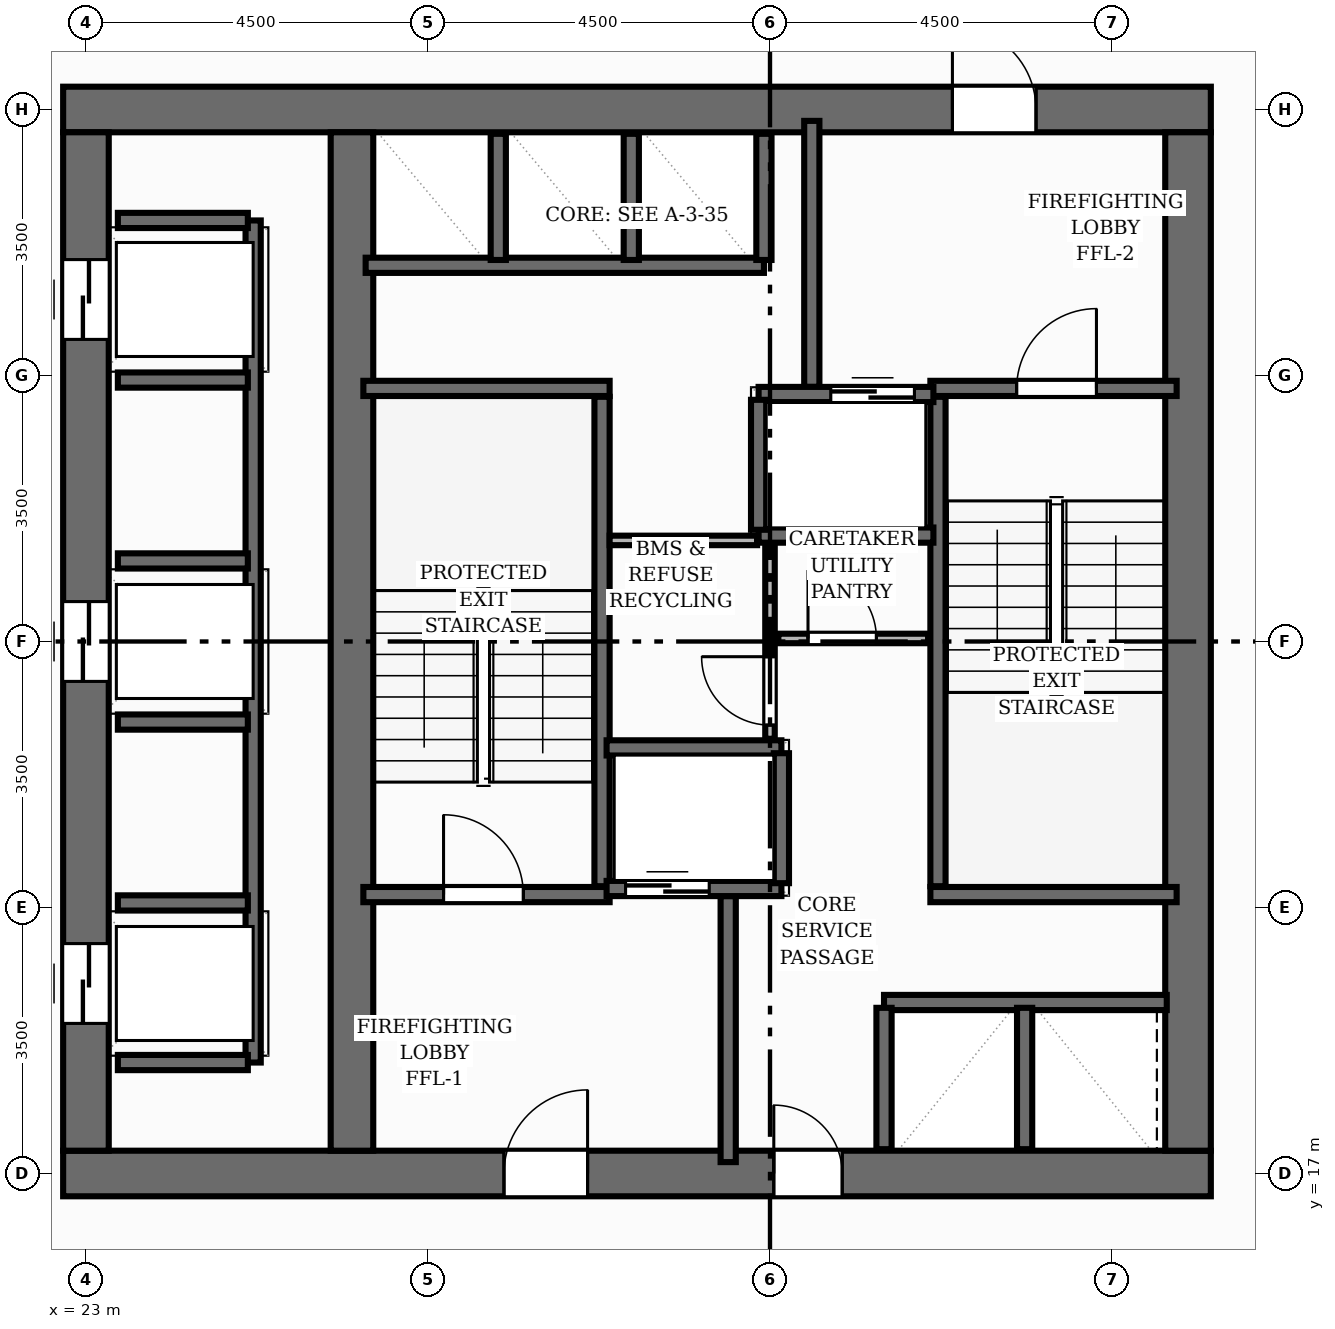
"""IFC4 building model, lengths in metres.
Left out: names, types, materials, properties, quantities, classifications, styles, units other than length and angle.
Written with IfcOpenShell. Run it as: python <this file> out.ifc"""

import sys

from ifc_helpers import new_model, si_unit, direction, frame, frame_2d, origin, place, context, subcontext, project, spatial, rectangle, extrude, element, fill, save


model = new_model("IFC4")
c1 = context("Model", 3, precision=1e-05, world=origin(), true_north=direction((0.0, 1.0)))
c2 = subcontext(c1, "Body", "Model", "MODEL_VIEW")
j1 = project(units=[si_unit("LENGTHUNIT", "METRE"), si_unit("PLANEANGLEUNIT", "RADIAN")], contexts=[c1])
p1 = place(None, origin())
s1 = spatial("IfcSite", under=j1, at=p1, CompositionType="ELEMENT")
p2 = place(p1, origin())
s2 = spatial("IfcBuilding", under=s1, at=p2, CompositionType="ELEMENT")
p3 = place(p2, frame((0.0, 0.0, 145.76)))
s3 = spatial("IfcBuildingStorey", under=s2, at=p3, CompositionType="ELEMENT", Elevation=145.76)
p4 = place(p3, frame((22.7, 17.0, 0.0), z_axis=(0.0, 0.0, 1.0), x_axis=(1.0, 0.0, 0.0)))
e1 = element("IfcWall", 1, at=p4, inside=s3, PredefinedType="SHEAR", context=c2, shape_type="SweptSolid", body=[
    extrude(rectangle(XDim=15.1, YDim=0.6, at=frame_2d((7.55, 0.0))), origin(), (0.0, 0.0, 1.0), 3.2),
])
p5 = place(p4, frame((5.8, 0.0, 0.0)))
e2 = element("IfcOpeningElement", 2, at=p5, cuts=e1, PredefinedType="OPENING", context=c2, shape_type="SweptSolid", body=[
    extrude(rectangle(XDim=1.1, YDim=2.15, at=frame_2d((0.55, 1.075))), frame((0.0, 0.31, 0.0), z_axis=(0.0, -1.0, 0.0), x_axis=(1.0, 0.0, 0.0)), (0.0, 0.0, 1.0), 0.62),
])
p6 = place(p4, frame((9.35, 0.0, 0.0)))
e3 = element("IfcOpeningElement", 3, at=p6, cuts=e1, PredefinedType="OPENING", context=c2, shape_type="SweptSolid", body=[
    extrude(rectangle(XDim=0.9, YDim=2.1, at=frame_2d((0.45, 1.05))), frame((0.0, 0.31, 0.0), z_axis=(0.0, -1.0, 0.0), x_axis=(1.0, 0.0, 0.0)), (0.0, 0.0, 1.0), 0.62),
])
p7 = place(p3, frame((22.7, 31.0, 0.0), z_axis=(0.0, 0.0, 1.0), x_axis=(1.0, 0.0, 0.0)))
e4 = element("IfcWall", 4, at=p7, inside=s3, PredefinedType="SHEAR", context=c2, shape_type="SweptSolid", body=[
    extrude(rectangle(XDim=15.1, YDim=0.6, at=frame_2d((7.55, 0.0))), origin(), (0.0, 0.0, 1.0), 3.2),
])
p8 = place(p7, frame((11.7, 0.0, 0.0)))
e5 = element("IfcOpeningElement", 5, at=p8, cuts=e4, PredefinedType="OPENING", context=c2, shape_type="SweptSolid", body=[
    extrude(rectangle(XDim=1.1, YDim=2.15, at=frame_2d((0.55, 1.075))), frame((0.0, 0.31, 0.0), z_axis=(0.0, -1.0, 0.0), x_axis=(1.0, 0.0, 0.0)), (0.0, 0.0, 1.0), 0.62),
])
p9 = place(p3, frame((23.0, 17.3, 0.0), z_axis=(0.0, 0.0, 1.0), x_axis=(0.0, 1.0, 0.0)))
e6 = element("IfcWall", 6, at=p9, inside=s3, PredefinedType="SHEAR", context=c2, shape_type="SweptSolid", body=[
    extrude(rectangle(XDim=13.4, YDim=0.6, at=frame_2d((6.7, 0.0))), origin(), (0.0, 0.0, 1.0), 3.2),
])
p10 = place(p9, frame((1.675, 0.0, 0.0)))
e7 = element("IfcOpeningElement", 7, at=p10, cuts=e6, PredefinedType="OPENING", context=c2, shape_type="SweptSolid", body=[
    extrude(rectangle(XDim=1.05, YDim=2.15, at=frame_2d((0.525, 1.075))), frame((0.0, 0.31, 0.0), z_axis=(0.0, -1.0, 0.0), x_axis=(1.0, 0.0, 0.0)), (0.0, 0.0, 1.0), 0.62),
])
p11 = place(p9, frame((6.175, 0.0, 0.0)))
e8 = element("IfcOpeningElement", 8, at=p11, cuts=e6, PredefinedType="OPENING", context=c2, shape_type="SweptSolid", body=[
    extrude(rectangle(XDim=1.05, YDim=2.15, at=frame_2d((0.525, 1.075))), frame((0.0, 0.31, 0.0), z_axis=(0.0, -1.0, 0.0), x_axis=(1.0, 0.0, 0.0)), (0.0, 0.0, 1.0), 0.62),
])
p12 = place(p9, frame((10.675, 0.0, 0.0)))
e9 = element("IfcOpeningElement", 9, at=p12, cuts=e6, PredefinedType="OPENING", context=c2, shape_type="SweptSolid", body=[
    extrude(rectangle(XDim=1.05, YDim=2.15, at=frame_2d((0.525, 1.075))), frame((0.0, 0.31, 0.0), z_axis=(0.0, -1.0, 0.0), x_axis=(1.0, 0.0, 0.0)), (0.0, 0.0, 1.0), 0.62),
])
p13 = place(p3, frame((37.5, 17.3, 0.0), z_axis=(0.0, 0.0, 1.0), x_axis=(0.0, 1.0, 0.0)))
e10 = element("IfcWall", 10, at=p13, inside=s3, PredefinedType="SHEAR", context=c2, shape_type="SweptSolid", body=[
    extrude(rectangle(XDim=13.4, YDim=0.6, at=frame_2d((6.7, 0.0))), origin(), (0.0, 0.0, 1.0), 3.2),
])
p14 = place(p3, frame((26.5, 17.3, 0.0), z_axis=(0.0, 0.0, 1.0), x_axis=(0.0, 1.0, 0.0)))
e11 = element("IfcWall", 11, at=p14, inside=s3, PredefinedType="SHEAR", context=c2, shape_type="SweptSolid", body=[
    extrude(rectangle(XDim=13.4, YDim=0.56, at=frame_2d((6.7, 0.0))), origin(), (0.0, 0.0, 1.0), 3.2),
])
p15 = place(p3, frame((29.79, 20.78, 0.0), z_axis=(0.0, 0.0, 1.0), x_axis=(0.0, 1.0, 0.0)))
e12 = element("IfcWall", 12, at=p15, inside=s3, PredefinedType="SHEAR", context=c2, shape_type="SweptSolid", body=[
    extrude(rectangle(XDim=6.44, YDim=0.2, at=frame_2d((3.22, 0.0))), origin(), (0.0, 0.0, 1.0), 3.2),
])
p16 = place(p3, frame((26.65, 27.33, 0.0), z_axis=(0.0, 0.0, 1.0), x_axis=(1.0, 0.0, 0.0)))
e13 = element("IfcWall", 13, at=p16, inside=s3, PredefinedType="SHEAR", context=c2, shape_type="SweptSolid", body=[
    extrude(rectangle(XDim=3.24, YDim=0.2, at=frame_2d((1.62, 0.0))), origin(), (0.0, 0.0, 1.0), 3.2),
])
p17 = place(p3, frame((26.65, 20.67, 0.0), z_axis=(0.0, 0.0, 1.0), x_axis=(1.0, 0.0, 0.0)))
e14 = element("IfcWall", 14, at=p17, inside=s3, PredefinedType="SHEAR", context=c2, shape_type="SweptSolid", body=[
    extrude(rectangle(XDim=3.24, YDim=0.2, at=frame_2d((1.62, 0.0))), origin(), (0.0, 0.0, 1.0), 3.2),
])
p18 = place(p17, frame((1.055, 0.0, 0.0)))
e15 = element("IfcOpeningElement", 15, at=p18, cuts=e14, PredefinedType="OPENING", context=c2, shape_type="SweptSolid", body=[
    extrude(rectangle(XDim=1.05, YDim=2.15, at=frame_2d((0.525, 1.075))), frame((0.0, 0.11, 0.0), z_axis=(0.0, -1.0, 0.0), x_axis=(1.0, 0.0, 0.0)), (0.0, 0.0, 1.0), 0.22),
])
p19 = place(p3, frame((34.21, 20.78, 0.0), z_axis=(0.0, 0.0, 1.0), x_axis=(0.0, 1.0, 0.0)))
e16 = element("IfcWall", 16, at=p19, inside=s3, PredefinedType="SHEAR", context=c2, shape_type="SweptSolid", body=[
    extrude(rectangle(XDim=6.44, YDim=0.2, at=frame_2d((3.22, 0.0))), origin(), (0.0, 0.0, 1.0), 3.2),
])
p20 = place(p3, frame((34.11, 20.67, 0.0), z_axis=(0.0, 0.0, 1.0), x_axis=(1.0, 0.0, 0.0)))
e17 = element("IfcWall", 17, at=p20, inside=s3, PredefinedType="SHEAR", context=c2, shape_type="SweptSolid", body=[
    extrude(rectangle(XDim=3.24, YDim=0.2, at=frame_2d((1.62, 0.0))), origin(), (0.0, 0.0, 1.0), 3.2),
])
p21 = place(p3, frame((34.11, 27.33, 0.0), z_axis=(0.0, 0.0, 1.0), x_axis=(1.0, 0.0, 0.0)))
e18 = element("IfcWall", 18, at=p21, inside=s3, PredefinedType="SHEAR", context=c2, shape_type="SweptSolid", body=[
    extrude(rectangle(XDim=3.24, YDim=0.2, at=frame_2d((1.62, 0.0))), origin(), (0.0, 0.0, 1.0), 3.2),
])
p22 = place(p21, frame((1.135, 0.0, 0.0)))
e19 = element("IfcOpeningElement", 19, at=p22, cuts=e18, PredefinedType="OPENING", context=c2, shape_type="SweptSolid", body=[
    extrude(rectangle(XDim=1.05, YDim=2.15, at=frame_2d((0.525, 1.075))), frame((0.0, 0.11, 0.0), z_axis=(0.0, -1.0, 0.0), x_axis=(1.0, 0.0, 0.0)), (0.0, 0.0, 1.0), 0.22),
])
for number, where, z_axis, x_axis in (
    (20, (31.45, 17.15, 0.0), (0.0, 0.0, 1.0), (0.0, 1.0, 0.0)),
    (21, (32.55, 27.35, 0.0), (0.0, 0.0, 1.0), (0.0, 1.0, 0.0)),
):
    element("IfcWall", number, at=place(p3, frame(where, z_axis=z_axis, x_axis=x_axis)), inside=s3, PredefinedType="SHEAR", context=c2, shape_type="SweptSolid", body=[
        extrude(rectangle(XDim=3.5, YDim=0.2, at=frame_2d((1.75, 0.0))), origin(), (0.0, 0.0, 1.0), 3.2),
    ])
p23 = place(p3, frame((29.85, 20.75, 0.0), z_axis=(0.0, 0.0, 1.0), x_axis=(1.0, 0.0, 0.0)))
e22 = element("IfcWall", 22, at=p23, inside=s3, PredefinedType="SHEAR", context=c2, shape_type="SweptSolid", body=[
    extrude(rectangle(XDim=2.3, YDim=0.2, at=frame_2d((1.15, 0.0))), origin(), (0.0, 0.0, 1.0), 3.2),
])
p24 = place(p23, frame((0.25, 0.0, 0.0)))
e23 = element("IfcOpeningElement", 23, at=p24, cuts=e22, PredefinedType="OPENING", context=c2, shape_type="SweptSolid", body=[
    extrude(rectangle(XDim=1.1, YDim=2.15, at=frame_2d((0.55, 1.075))), frame((0.0, 0.11, 0.0), z_axis=(0.0, -1.0, 0.0), x_axis=(1.0, 0.0, 0.0)), (0.0, 0.0, 1.0), 0.22),
])
p25 = place(p3, frame((29.85, 22.6, 0.0), z_axis=(0.0, 0.0, 1.0), x_axis=(1.0, 0.0, 0.0)))
e24 = element("IfcWall", 24, at=p25, inside=s3, PredefinedType="SHEAR", context=c2, shape_type="SweptSolid", body=[
    extrude(rectangle(XDim=2.3, YDim=0.2, at=frame_2d((1.15, 0.0))), origin(), (0.0, 0.0, 1.0), 3.2),
])
p26 = place(p3, frame((32.15, 20.82, 0.0), z_axis=(0.0, 0.0, 1.0), x_axis=(0.0, 1.0, 0.0)))
e25 = element("IfcWall", 25, at=p26, inside=s3, PredefinedType="SHEAR", context=c2, shape_type="SweptSolid", body=[
    extrude(rectangle(XDim=1.71, YDim=0.2, at=frame_2d((0.855, 0.0))), origin(), (0.0, 0.0, 1.0), 3.2),
])
p27 = place(p3, frame((31.85, 27.25, 0.0), z_axis=(0.0, 0.0, 1.0), x_axis=(1.0, 0.0, 0.0)))
e26 = element("IfcWall", 26, at=p27, inside=s3, PredefinedType="SHEAR", context=c2, shape_type="SweptSolid", body=[
    extrude(rectangle(XDim=2.3, YDim=0.2, at=frame_2d((1.15, 0.0))), origin(), (0.0, 0.0, 1.0), 3.2),
])
p28 = place(p27, frame((0.95, 0.0, 0.0)))
e27 = element("IfcOpeningElement", 27, at=p28, cuts=e26, PredefinedType="OPENING", context=c2, shape_type="SweptSolid", body=[
    extrude(rectangle(XDim=1.1, YDim=2.15, at=frame_2d((0.55, 1.075))), frame((0.0, 0.11, 0.0), z_axis=(0.0, -1.0, 0.0), x_axis=(1.0, 0.0, 0.0)), (0.0, 0.0, 1.0), 0.22),
])
p29 = place(p3, frame((31.85, 25.4, 0.0), z_axis=(0.0, 0.0, 1.0), x_axis=(1.0, 0.0, 0.0)))
e28 = element("IfcWall", 28, at=p29, inside=s3, PredefinedType="SHEAR", context=c2, shape_type="SweptSolid", body=[
    extrude(rectangle(XDim=2.3, YDim=0.2, at=frame_2d((1.15, 0.0))), origin(), (0.0, 0.0, 1.0), 3.2),
])
p30 = place(p3, frame((31.85, 25.47, 0.0), z_axis=(0.0, 0.0, 1.0), x_axis=(0.0, 1.0, 0.0)))
e29 = element("IfcWall", 29, at=p30, inside=s3, PredefinedType="SHEAR", context=c2, shape_type="SweptSolid", body=[
    extrude(rectangle(XDim=1.71, YDim=0.2, at=frame_2d((0.855, 0.0))), origin(), (0.0, 0.0, 1.0), 3.2),
])
p31 = place(p3, frame((25.2, 18.46, 0.0), z_axis=(0.0, 0.0, 1.0), x_axis=(0.0, 1.0, 0.0)))
e30 = element("IfcWall", 30, at=p31, inside=s3, PredefinedType="SHEAR", context=c2, shape_type="SweptSolid", body=[
    extrude(rectangle(XDim=11.08, YDim=0.2, at=frame_2d((5.54, 0.0))), origin(), (0.0, 0.0, 1.0), 3.2),
])
for number, where, z_axis, x_axis in (
    (31, (23.42, 18.46, 0.0), (0.0, 0.0, 1.0), (1.0, 0.0, 0.0)),
    (32, (23.42, 29.54, 0.0), (0.0, 0.0, 1.0), (1.0, 0.0, 0.0)),
    (33, (23.42, 20.56, 0.0), (0.0, 0.0, 1.0), (1.0, 0.0, 0.0)),
    (34, (23.42, 22.94, 0.0), (0.0, 0.0, 1.0), (1.0, 0.0, 0.0)),
    (35, (23.42, 25.06, 0.0), (0.0, 0.0, 1.0), (1.0, 0.0, 0.0)),
    (36, (23.42, 27.44, 0.0), (0.0, 0.0, 1.0), (1.0, 0.0, 0.0)),
):
    element("IfcWall", number, at=place(p3, frame(where, z_axis=z_axis, x_axis=x_axis)), inside=s3, PredefinedType="SHEAR", context=c2, shape_type="SweptSolid", body=[
        extrude(rectangle(XDim=1.71, YDim=0.2, at=frame_2d((0.855, 0.0))), origin(), (0.0, 0.0, 1.0), 3.2),
    ])
p32 = place(p3, frame((26.68, 28.95, 0.0), z_axis=(0.0, 0.0, 1.0), x_axis=(1.0, 0.0, 0.0)))
e37 = element("IfcWall", 37, at=p32, inside=s3, PredefinedType="SHEAR", context=c2, shape_type="SweptSolid", body=[
    extrude(rectangle(XDim=5.24, YDim=0.2, at=frame_2d((2.62, 0.0))), origin(), (0.0, 0.0, 1.0), 3.2),
])
for number, where, z_axis, x_axis in (
    (38, (31.92, 29.02, 0.0), (0.0, 0.0, 1.0), (0.0, 1.0, 0.0)),
    (39, (28.425, 29.02, 0.0), (0.0, 0.0, 1.0), (0.0, 1.0, 0.0)),
    (40, (30.175, 29.02, 0.0), (0.0, 0.0, 1.0), (0.0, 1.0, 0.0)),
):
    element("IfcWall", number, at=place(p3, frame(where, z_axis=z_axis, x_axis=x_axis)), inside=s3, PredefinedType="SHEAR", context=c2, shape_type="SweptSolid", body=[
        extrude(rectangle(XDim=1.66, YDim=0.2, at=frame_2d((0.83, 0.0))), origin(), (0.0, 0.0, 1.0), 3.2),
    ])
p33 = place(p3, frame((33.5, 19.25, 0.0), z_axis=(0.0, 0.0, 1.0), x_axis=(1.0, 0.0, 0.0)))
e41 = element("IfcWall", 41, at=p33, inside=s3, PredefinedType="SHEAR", context=c2, shape_type="SweptSolid", body=[
    extrude(rectangle(XDim=3.72, YDim=0.2, at=frame_2d((1.86, 0.0))), origin(), (0.0, 0.0, 1.0), 3.2),
])
for number, where, z_axis, x_axis in (
    (42, (33.5, 17.32, 0.0), (0.0, 0.0, 1.0), (0.0, 1.0, 0.0)),
    (43, (35.35, 17.32, 0.0), (0.0, 0.0, 1.0), (0.0, 1.0, 0.0)),
):
    element("IfcWall", number, at=place(p3, frame(where, z_axis=z_axis, x_axis=x_axis)), inside=s3, PredefinedType="SHEAR", context=c2, shape_type="SweptSolid", body=[
        extrude(rectangle(XDim=1.86, YDim=0.2, at=frame_2d((0.93, 0.0))), origin(), (0.0, 0.0, 1.0), 3.2),
    ])
p34 = place(p3, frame((32.0, 22.72, 0.0), z_axis=(0.0, 0.0, 1.0), x_axis=(0.0, 1.0, 0.0)))
e44 = element("IfcWall", 44, at=p34, inside=s3, PredefinedType="PARTITIONING", context=c2, shape_type="SweptSolid", body=[
    extrude(rectangle(XDim=2.52, YDim=0.125, at=frame_2d((1.26, 0.0))), origin(), (0.0, 0.0, 1.0), 2.955),
])
p35 = place(p34, frame((0.18, 0.0, 0.0)))
e45 = element("IfcOpeningElement", 45, at=p35, cuts=e44, PredefinedType="OPENING", context=c2, shape_type="SweptSolid", body=[
    extrude(rectangle(XDim=0.9, YDim=2.1, at=frame_2d((0.45, 1.05))), frame((0.0, 0.073, 0.0), z_axis=(0.0, -1.0, 0.0), x_axis=(1.0, 0.0, 0.0)), (0.0, 0.0, 1.0), 0.145),
])
p36 = place(p3, frame((32.11, 24.04, 0.0), z_axis=(0.0, 0.0, 1.0), x_axis=(1.0, 0.0, 0.0)))
e46 = element("IfcWall", 46, at=p36, inside=s3, PredefinedType="PARTITIONING", context=c2, shape_type="SweptSolid", body=[
    extrude(rectangle(XDim=1.97, YDim=0.125, at=frame_2d((0.985, 0.0))), origin(), (0.0, 0.0, 1.0), 2.955),
])
p37 = place(p36, frame((0.39, 0.0, 0.0)))
e47 = element("IfcOpeningElement", 47, at=p37, cuts=e46, PredefinedType="OPENING", context=c2, shape_type="SweptSolid", body=[
    extrude(rectangle(XDim=0.9, YDim=2.1, at=frame_2d((0.45, 1.05))), frame((0.0, 0.073, 0.0), z_axis=(0.0, -1.0, 0.0), x_axis=(1.0, 0.0, 0.0)), (0.0, 0.0, 1.0), 0.145),
])
p38 = place(p3, frame((29.89, 25.33, 0.0), z_axis=(0.0, 0.0, 1.0), x_axis=(1.0, 0.0, 0.0)))
e48 = element("IfcWall", 48, at=p38, inside=s3, PredefinedType="PARTITIONING", context=c2, shape_type="SweptSolid", body=[
    extrude(rectangle(XDim=1.94, YDim=0.125, at=frame_2d((0.97, 0.0))), origin(), (0.0, 0.0, 1.0), 2.955),
])
p39 = place(p3, frame((43.184, 17.96, 0.0), z_axis=(0.0, 0.0, 1.0), x_axis=(-0.790862802872, -0.611993486104, 0.0)))
e49 = element("IfcWall", 49, at=p39, inside=s3, PredefinedType="PARTITIONING", context=c2, shape_type="SweptSolid", body=[
    extrude(rectangle(XDim=9.975, YDim=0.125, at=frame_2d((4.987, 0.0))), origin(), (0.0, 0.0, 1.0), 2.411),
])
p40 = place(p39, frame((3.417, 0.0, 0.0)))
e50 = element("IfcOpeningElement", 50, at=p40, cuts=e49, PredefinedType="OPENING", context=c2, shape_type="SweptSolid", body=[
    extrude(rectangle(XDim=0.9, YDim=2.1, at=frame_2d((0.45, 1.05))), frame((0.0, 0.073, 0.0), z_axis=(0.0, -1.0, 0.0), x_axis=(1.0, 0.0, 0.0)), (0.0, 0.0, 1.0), 0.145),
])
p41 = place(p18, origin())
e51 = element("IfcDoor", 51, at=p41, inside=s3, OperationType="SINGLE_SWING_LEFT", PredefinedType="DOOR", context=c2, shape_type="SweptSolid", body=[
    extrude(rectangle(XDim=1.05, YDim=2.15, at=frame_2d((0.525, 1.075))), frame((0.0, 0.025, 0.0), z_axis=(0.0, -1.0, 0.0), x_axis=(1.0, 0.0, 0.0)), (0.0, 0.0, 1.0), 0.05),
])
fill(e15, e51)
p42 = place(p22, origin())
e52 = element("IfcDoor", 52, at=p42, inside=s3, OperationType="SINGLE_SWING_RIGHT", PredefinedType="DOOR", context=c2, shape_type="SweptSolid", body=[
    extrude(rectangle(XDim=1.05, YDim=2.15, at=frame_2d((0.525, 1.075))), frame((0.0, 0.025, 0.0), z_axis=(0.0, -1.0, 0.0), x_axis=(1.0, 0.0, 0.0)), (0.0, 0.0, 1.0), 0.05),
])
fill(e19, e52)
p43 = place(p5, origin())
e53 = element("IfcDoor", 53, at=p43, inside=s3, OperationType="SINGLE_SWING_RIGHT", PredefinedType="DOOR", context=c2, shape_type="SweptSolid", body=[
    extrude(rectangle(XDim=1.1, YDim=2.15, at=frame_2d((0.55, 1.075))), frame((0.0, 0.025, 0.0), z_axis=(0.0, -1.0, 0.0), x_axis=(1.0, 0.0, 0.0)), (0.0, 0.0, 1.0), 0.05),
])
fill(e2, e53)
p44 = place(p8, origin())
e54 = element("IfcDoor", 54, at=p44, inside=s3, OperationType="SINGLE_SWING_LEFT", PredefinedType="DOOR", context=c2, shape_type="SweptSolid", body=[
    extrude(rectangle(XDim=1.1, YDim=2.15, at=frame_2d((0.55, 1.075))), frame((0.0, 0.025, 0.0), z_axis=(0.0, -1.0, 0.0), x_axis=(1.0, 0.0, 0.0)), (0.0, 0.0, 1.0), 0.05),
])
fill(e5, e54)
p45 = place(p24, origin())
e55 = element("IfcDoor", 55, at=p45, inside=s3, OperationType="DOUBLE_DOOR_SLIDING", PredefinedType="DOOR", context=c2, shape_type="SweptSolid", body=[
    extrude(rectangle(XDim=1.1, YDim=2.15, at=frame_2d((0.55, 1.075))), frame((0.0, 0.025, 0.0), z_axis=(0.0, -1.0, 0.0), x_axis=(1.0, 0.0, 0.0)), (0.0, 0.0, 1.0), 0.05),
])
fill(e23, e55)
p46 = place(p28, origin())
e56 = element("IfcDoor", 56, at=p46, inside=s3, OperationType="DOUBLE_DOOR_SLIDING", PredefinedType="DOOR", context=c2, shape_type="SweptSolid", body=[
    extrude(rectangle(XDim=1.1, YDim=2.15, at=frame_2d((0.55, 1.075))), frame((0.0, 0.025, 0.0), z_axis=(0.0, -1.0, 0.0), x_axis=(1.0, 0.0, 0.0)), (0.0, 0.0, 1.0), 0.05),
])
fill(e27, e56)
p47 = place(p10, origin())
e57 = element("IfcDoor", 57, at=p47, inside=s3, OperationType="DOUBLE_DOOR_SLIDING", PredefinedType="DOOR", context=c2, shape_type="SweptSolid", body=[
    extrude(rectangle(XDim=1.05, YDim=2.15, at=frame_2d((0.525, 1.075))), frame((0.0, 0.025, 0.0), z_axis=(0.0, -1.0, 0.0), x_axis=(1.0, 0.0, 0.0)), (0.0, 0.0, 1.0), 0.05),
])
fill(e7, e57)
p48 = place(p11, origin())
e58 = element("IfcDoor", 58, at=p48, inside=s3, OperationType="DOUBLE_DOOR_SLIDING", PredefinedType="DOOR", context=c2, shape_type="SweptSolid", body=[
    extrude(rectangle(XDim=1.05, YDim=2.15, at=frame_2d((0.525, 1.075))), frame((0.0, 0.025, 0.0), z_axis=(0.0, -1.0, 0.0), x_axis=(1.0, 0.0, 0.0)), (0.0, 0.0, 1.0), 0.05),
])
fill(e8, e58)
p49 = place(p12, origin())
e59 = element("IfcDoor", 59, at=p49, inside=s3, OperationType="DOUBLE_DOOR_SLIDING", PredefinedType="DOOR", context=c2, shape_type="SweptSolid", body=[
    extrude(rectangle(XDim=1.05, YDim=2.15, at=frame_2d((0.525, 1.075))), frame((0.0, 0.025, 0.0), z_axis=(0.0, -1.0, 0.0), x_axis=(1.0, 0.0, 0.0)), (0.0, 0.0, 1.0), 0.05),
])
fill(e9, e59)
p50 = place(p6, origin())
e60 = element("IfcDoor", 60, at=p50, inside=s3, OperationType="SINGLE_SWING_LEFT", PredefinedType="DOOR", context=c2, shape_type="SweptSolid", body=[
    extrude(rectangle(XDim=0.9, YDim=2.1, at=frame_2d((0.45, 1.05))), frame((0.0, 0.025, 0.0), z_axis=(0.0, -1.0, 0.0), x_axis=(1.0, 0.0, 0.0)), (0.0, 0.0, 1.0), 0.05),
])
fill(e3, e60)
p51 = place(p37, origin())
e61 = element("IfcDoor", 61, at=p51, inside=s3, OperationType="SINGLE_SWING_LEFT", PredefinedType="DOOR", context=c2, shape_type="SweptSolid", body=[
    extrude(rectangle(XDim=0.9, YDim=2.1, at=frame_2d((0.45, 1.05))), frame((0.0, 0.025, 0.0), z_axis=(0.0, -1.0, 0.0), x_axis=(1.0, 0.0, 0.0)), (0.0, 0.0, 1.0), 0.05),
])
fill(e47, e61)
p52 = place(p35, origin())
e62 = element("IfcDoor", 62, at=p52, inside=s3, OperationType="SINGLE_SWING_RIGHT", PredefinedType="DOOR", context=c2, shape_type="SweptSolid", body=[
    extrude(rectangle(XDim=0.9, YDim=2.1, at=frame_2d((0.45, 1.05))), frame((0.0, 0.025, 0.0), z_axis=(0.0, -1.0, 0.0), x_axis=(1.0, 0.0, 0.0)), (0.0, 0.0, 1.0), 0.05),
])
fill(e45, e62)
save(model, sys.argv[1])
